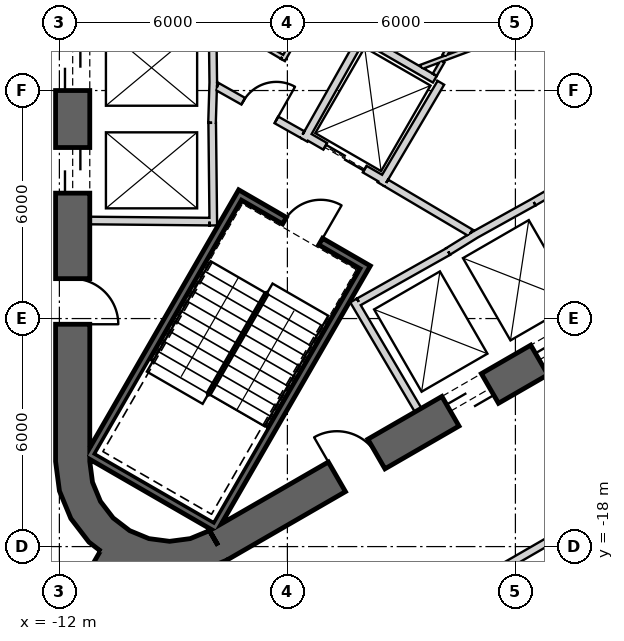
"""IFC4 building model, lengths in metres.
Left out: names, types, materials, properties, quantities, classifications, styles, units other than length and angle.
Written with IfcOpenShell. Run it as: python <this file> out.ifc"""

import sys

from ifc_helpers import new_model, si_unit, direction, frame, frame_2d, origin, place, context, subcontext, project, spatial, polyline, rectangle, outline, extrude, element, fill, save


model = new_model("IFC4")
c1 = context("Model", 3, precision=1e-05, world=origin(), true_north=direction((0.0, 1.0)))
c2 = subcontext(c1, "Body", "Model", "MODEL_VIEW")
j1 = project(units=[si_unit("LENGTHUNIT", "METRE"), si_unit("PLANEANGLEUNIT", "RADIAN")], contexts=[c1])
p1 = place(None, origin())
s1 = spatial("IfcSite", under=j1, at=p1, CompositionType="ELEMENT")
p2 = place(p1, origin())
s2 = spatial("IfcBuilding", under=s1, at=p2, CompositionType="ELEMENT")
p3 = place(p2, frame((0.0, 0.0, 45.5)))
s3 = spatial("IfcBuildingStorey", under=s2, at=p3, CompositionType="ELEMENT", Elevation=45.5)
p4 = place(p3, frame((-11.65, 15.762, 0.0), z_axis=(0.0, 0.0, 1.0), x_axis=(0.0, -1.0, 0.0)))
e1 = element("IfcWall", 1, at=p4, inside=s3, PredefinedType="SHEAR", context=c2, shape_type="SweptSolid", body=[
    extrude(rectangle(XDim=31.523, YDim=0.9, at=frame_2d((15.762, 0.0))), origin(), (0.0, 0.0, 1.0), 4.1),
])
p5 = place(p4, frame((7.062, 0.0, 0.0)))
e2 = element("IfcOpeningElement", 2, at=p5, cuts=e1, PredefinedType="OPENING", context=c2, shape_type="SweptSolid", body=[
    extrude(rectangle(XDim=1.2, YDim=2.4, at=frame_2d((0.6, 1.2))), frame((0.0, 0.46, 0.0), z_axis=(0.0, -1.0, 0.0), x_axis=(1.0, 0.0, 0.0)), (0.0, 0.0, 1.0), 0.92),
])
p6 = place(p4, frame((9.762, 0.0, 0.0)))
e3 = element("IfcOpeningElement", 3, at=p6, cuts=e1, PredefinedType="OPENING", context=c2, shape_type="SweptSolid", body=[
    extrude(rectangle(XDim=1.2, YDim=2.4, at=frame_2d((0.6, 1.2))), frame((0.0, 0.46, 0.0), z_axis=(0.0, -1.0, 0.0), x_axis=(1.0, 0.0, 0.0)), (0.0, 0.0, 1.0), 0.92),
])
p7 = place(p4, frame((12.462, 0.0, 0.0)))
e4 = element("IfcOpeningElement", 4, at=p7, cuts=e1, PredefinedType="OPENING", context=c2, shape_type="SweptSolid", body=[
    extrude(rectangle(XDim=1.2, YDim=2.4, at=frame_2d((0.6, 1.2))), frame((0.0, 0.46, 0.0), z_axis=(0.0, -1.0, 0.0), x_axis=(1.0, 0.0, 0.0)), (0.0, 0.0, 1.0), 0.92),
])
p8 = place(p4, frame((15.162, 0.0, 0.0)))
e5 = element("IfcOpeningElement", 5, at=p8, cuts=e1, PredefinedType="OPENING", context=c2, shape_type="SweptSolid", body=[
    extrude(rectangle(XDim=1.2, YDim=2.4, at=frame_2d((0.6, 1.2))), frame((0.0, 0.46, 0.0), z_axis=(0.0, -1.0, 0.0), x_axis=(1.0, 0.0, 0.0)), (0.0, 0.0, 1.0), 0.92),
])
p9 = place(p4, frame((17.862, 0.0, 0.0)))
e6 = element("IfcOpeningElement", 6, at=p9, cuts=e1, PredefinedType="OPENING", context=c2, shape_type="SweptSolid", body=[
    extrude(rectangle(XDim=1.2, YDim=2.4, at=frame_2d((0.6, 1.2))), frame((0.0, 0.46, 0.0), z_axis=(0.0, -1.0, 0.0), x_axis=(1.0, 0.0, 0.0)), (0.0, 0.0, 1.0), 0.92),
])
p10 = place(p4, frame((20.562, 0.0, 0.0)))
e7 = element("IfcOpeningElement", 7, at=p10, cuts=e1, PredefinedType="OPENING", context=c2, shape_type="SweptSolid", body=[
    extrude(rectangle(XDim=1.2, YDim=2.4, at=frame_2d((0.6, 1.2))), frame((0.0, 0.46, 0.0), z_axis=(0.0, -1.0, 0.0), x_axis=(1.0, 0.0, 0.0)), (0.0, 0.0, 1.0), 0.92),
])
p11 = place(p4, frame((23.262, 0.0, 0.0)))
e8 = element("IfcOpeningElement", 8, at=p11, cuts=e1, PredefinedType="OPENING", context=c2, shape_type="SweptSolid", body=[
    extrude(rectangle(XDim=1.2, YDim=2.4, at=frame_2d((0.6, 1.2))), frame((0.0, 0.46, 0.0), z_axis=(0.0, -1.0, 0.0), x_axis=(1.0, 0.0, 0.0)), (0.0, 0.0, 1.0), 0.92),
])
p12 = place(p4, frame((3.612, 0.0, 0.0)))
e9 = element("IfcOpeningElement", 9, at=p12, cuts=e1, PredefinedType="OPENING", context=c2, shape_type="SweptSolid", body=[
    extrude(rectangle(XDim=1.2, YDim=2.4, at=frame_2d((0.6, 1.2))), frame((0.0, 0.46, 0.0), z_axis=(0.0, -1.0, 0.0), x_axis=(1.0, 0.0, 0.0)), (0.0, 0.0, 1.0), 0.92),
])
p13 = place(p4, frame((26.712, 0.0, 0.0)))
e10 = element("IfcOpeningElement", 10, at=p13, cuts=e1, PredefinedType="OPENING", context=c2, shape_type="SweptSolid", body=[
    extrude(rectangle(XDim=1.2, YDim=2.4, at=frame_2d((0.6, 1.2))), frame((0.0, 0.46, 0.0), z_axis=(0.0, -1.0, 0.0), x_axis=(1.0, 0.0, 0.0)), (0.0, 0.0, 1.0), 0.92),
])
p14 = place(p3, frame((-7.825, -17.97, 0.0), z_axis=(0.0, 0.0, 1.0), x_axis=(0.866028369851, 0.499994862586, 0.0)))
e11 = element("IfcWall", 11, at=p14, inside=s3, PredefinedType="SHEAR", context=c2, shape_type="SweptSolid", body=[
    extrude(rectangle(XDim=31.523, YDim=0.9, at=frame_2d((15.762, 0.0))), origin(), (0.0, 0.0, 1.0), 4.1),
])
p15 = place(p14, frame((7.062, 0.0, 0.0)))
e12 = element("IfcOpeningElement", 12, at=p15, cuts=e11, PredefinedType="OPENING", context=c2, shape_type="SweptSolid", body=[
    extrude(rectangle(XDim=1.2, YDim=2.4, at=frame_2d((0.6, 1.2))), frame((0.0, 0.46, 0.0), z_axis=(0.0, -1.0, 0.0), x_axis=(1.0, 0.0, 0.0)), (0.0, 0.0, 1.0), 0.92),
])
p16 = place(p14, frame((9.762, 0.0, 0.0)))
e13 = element("IfcOpeningElement", 13, at=p16, cuts=e11, PredefinedType="OPENING", context=c2, shape_type="SweptSolid", body=[
    extrude(rectangle(XDim=1.2, YDim=2.4, at=frame_2d((0.6, 1.2))), frame((0.0, 0.46, 0.0), z_axis=(0.0, -1.0, 0.0), x_axis=(1.0, 0.0, 0.0)), (0.0, 0.0, 1.0), 0.92),
])
p17 = place(p14, frame((12.462, 0.0, 0.0)))
e14 = element("IfcOpeningElement", 14, at=p17, cuts=e11, PredefinedType="OPENING", context=c2, shape_type="SweptSolid", body=[
    extrude(rectangle(XDim=1.2, YDim=2.4, at=frame_2d((0.6, 1.2))), frame((0.0, 0.46, 0.0), z_axis=(0.0, -1.0, 0.0), x_axis=(1.0, 0.0, 0.0)), (0.0, 0.0, 1.0), 0.92),
])
p18 = place(p14, frame((15.162, 0.0, 0.0)))
e15 = element("IfcOpeningElement", 15, at=p18, cuts=e11, PredefinedType="OPENING", context=c2, shape_type="SweptSolid", body=[
    extrude(rectangle(XDim=1.2, YDim=2.4, at=frame_2d((0.6, 1.2))), frame((0.0, 0.46, 0.0), z_axis=(0.0, -1.0, 0.0), x_axis=(1.0, 0.0, 0.0)), (0.0, 0.0, 1.0), 0.92),
])
p19 = place(p14, frame((17.862, 0.0, 0.0)))
e16 = element("IfcOpeningElement", 16, at=p19, cuts=e11, PredefinedType="OPENING", context=c2, shape_type="SweptSolid", body=[
    extrude(rectangle(XDim=1.2, YDim=2.4, at=frame_2d((0.6, 1.2))), frame((0.0, 0.46, 0.0), z_axis=(0.0, -1.0, 0.0), x_axis=(1.0, 0.0, 0.0)), (0.0, 0.0, 1.0), 0.92),
])
p20 = place(p14, frame((20.562, 0.0, 0.0)))
e17 = element("IfcOpeningElement", 17, at=p20, cuts=e11, PredefinedType="OPENING", context=c2, shape_type="SweptSolid", body=[
    extrude(rectangle(XDim=1.2, YDim=2.4, at=frame_2d((0.6, 1.2))), frame((0.0, 0.46, 0.0), z_axis=(0.0, -1.0, 0.0), x_axis=(1.0, 0.0, 0.0)), (0.0, 0.0, 1.0), 0.92),
])
p21 = place(p14, frame((26.712, 0.0, 0.0)))
e18 = element("IfcOpeningElement", 18, at=p21, cuts=e11, PredefinedType="OPENING", context=c2, shape_type="SweptSolid", body=[
    extrude(rectangle(XDim=1.2, YDim=2.4, at=frame_2d((0.6, 1.2))), frame((0.0, 0.46, 0.0), z_axis=(0.0, -1.0, 0.0), x_axis=(1.0, 0.0, 0.0)), (0.0, 0.0, 1.0), 0.92),
])
p22 = place(p14, frame((3.612, 0.0, 0.0)))
e19 = element("IfcOpeningElement", 19, at=p22, cuts=e11, PredefinedType="OPENING", context=c2, shape_type="SweptSolid", body=[
    extrude(rectangle(XDim=1.2, YDim=2.4, at=frame_2d((0.6, 1.2))), frame((0.0, 0.46, 0.0), z_axis=(0.0, -1.0, 0.0), x_axis=(1.0, 0.0, 0.0)), (0.0, 0.0, 1.0), 0.92),
])
p23 = place(p3, origin())
e20 = element("IfcWall", 20, at=p23, inside=s3, PredefinedType="SHEAR", context=c2, shape_type="SweptSolid", body=[
    extrude(outline(polyline([(-12.1, -15.762), (-11.998, -16.538), (-11.698, -17.262), (-11.221, -17.883), (-10.6, -18.36), (-9.876, -18.659), (-9.1, -18.762), (-8.323, -18.659), (-7.6, -18.36), (-8.05, -17.58), (-8.556, -17.79), (-9.1, -17.862), (-9.644, -17.79), (-10.15, -17.58), (-10.585, -17.247), (-10.919, -16.812), (-11.128, -16.305), (-11.2, -15.762), (-12.1, -15.762)])), origin(), (0.0, 0.0, 1.0), 4.1),
])
p24 = place(p3, frame((-10.575, -18.316, 0.0), z_axis=(0.0, 0.0, 1.0), x_axis=(-0.499996272984, -0.866027555568, 0.0)))
e21 = element("IfcWall", 21, at=p24, inside=s3, PredefinedType="SHEAR", context=c2, shape_type="SweptSolid", body=[
    extrude(rectangle(XDim=14.098, YDim=0.8, at=frame_2d((7.049, 0.0))), origin(), (0.0, 0.0, 1.0), 4.1),
])
p25 = place(p24, frame((0.7, 0.0, 0.0)))
e22 = element("IfcOpeningElement", 22, at=p25, cuts=e21, PredefinedType="OPENING", context=c2, shape_type="SweptSolid", body=[
    extrude(rectangle(XDim=1.4, YDim=2.4, at=frame_2d((0.7, 1.2))), frame((0.0, 0.41, 0.0), z_axis=(0.0, -1.0, 0.0), x_axis=(1.0, 0.0, 0.0)), (0.0, 0.0, 1.0), 0.82),
])
p26 = place(p3, frame((-7.95, -5.772, 0.0), z_axis=(0.0, 0.0, 1.0), x_axis=(-0.030803413295, -0.999525462272, 0.0)))
e23 = element("IfcWall", 23, at=p26, inside=s3, PredefinedType="PLUMBINGWALL", context=c2, shape_type="SweptSolid", body=[
    extrude(rectangle(XDim=1.078, YDim=0.2, at=frame_2d((0.539, 0.0))), origin(), (0.0, 0.0, 1.0), 3.8),
])
p27 = place(p3, frame((-7.971, -4.05, 0.0), z_axis=(0.0, 0.0, 1.0), x_axis=(0.012042535896, -0.999927486035, 0.0)))
e24 = element("IfcWall", 24, at=p27, inside=s3, PredefinedType="PLUMBINGWALL", context=c2, shape_type="SweptSolid", body=[
    extrude(rectangle(XDim=1.845, YDim=0.2, at=frame_2d((0.922, 0.0))), origin(), (0.0, 0.0, 1.0), 3.8),
])
p28 = place(p3, frame((-7.979, -6.85, 0.0), z_axis=(0.0, 0.0, 1.0), x_axis=(0.011121475088, -0.999938154483, 0.0)))
e25 = element("IfcWall", 25, at=p28, inside=s3, PredefinedType="PLUMBINGWALL", context=c2, shape_type="SweptSolid", body=[
    extrude(rectangle(XDim=2.7, YDim=0.2, at=frame_2d((1.35, 0.0))), origin(), (0.0, 0.0, 1.0), 3.8),
])
p29 = place(p3, frame((-8.05, -9.449, 0.0), z_axis=(0.0, 0.0, 1.0), x_axis=(-0.999957467379, 0.009222983926, 0.0)))
e26 = element("IfcWall", 26, at=p29, inside=s3, PredefinedType="PLUMBINGWALL", context=c2, shape_type="SweptSolid", body=[
    extrude(rectangle(XDim=3.15, YDim=0.2, at=frame_2d((1.575, 0.0))), origin(), (0.0, 0.0, 1.0), 3.8),
])
p30 = place(p3, frame((0.483, -8.936, 0.0), z_axis=(0.0, 0.0, 1.0), x_axis=(0.866030989016, 0.499990325971, 0.0)))
e27 = element("IfcWall", 27, at=p30, inside=s3, PredefinedType="PLUMBINGWALL", context=c2, shape_type="SweptSolid", body=[
    extrude(rectangle(XDim=8.1, YDim=0.2, at=frame_2d((4.05, 0.0))), origin(), (0.0, 0.0, 1.0), 3.8),
])
p31 = place(p3, frame((-2.558, -14.409, 0.0), z_axis=(0.0, 0.0, 1.0), x_axis=(-0.507997497166, 0.861358544901, 0.0)))
e28 = element("IfcWall", 28, at=p31, inside=s3, PredefinedType="PLUMBINGWALL", context=c2, shape_type="SweptSolid", body=[
    extrude(rectangle(XDim=3.35, YDim=0.2, at=frame_2d((1.675, 0.0))), origin(), (0.0, 0.0, 1.0), 3.8),
])
p32 = place(p3, frame((-1.769, -10.237, 0.0), z_axis=(0.0, 0.0, 1.0), x_axis=(-0.871534483978, -0.490334215854, 0.0)))
e29 = element("IfcWall", 29, at=p32, inside=s3, PredefinedType="PLUMBINGWALL", context=c2, shape_type="SweptSolid", body=[
    extrude(rectangle(XDim=2.7, YDim=0.2, at=frame_2d((1.35, 0.0))), origin(), (0.0, 0.0, 1.0), 3.8),
])
p33 = place(p3, frame((-1.024, -9.771, 0.0), z_axis=(0.0, 0.0, 1.0), x_axis=(-0.850348075135, -0.526220629693, 0.0)))
e30 = element("IfcWall", 30, at=p33, inside=s3, PredefinedType="PLUMBINGWALL", context=c2, shape_type="SweptSolid", body=[
    extrude(rectangle(XDim=0.878, YDim=0.2, at=frame_2d((0.439, 0.0))), origin(), (0.0, 0.0, 1.0), 3.8),
])
p34 = place(p3, frame((-1.13, -9.831, 0.0), z_axis=(0.0, 0.0, 1.0), x_axis=(0.874269620932, 0.485440655401, 0.0)))
e31 = element("IfcWall", 31, at=p34, inside=s3, PredefinedType="PLUMBINGWALL", context=c2, shape_type="SweptSolid", body=[
    extrude(rectangle(XDim=1.845, YDim=0.2, at=frame_2d((0.922, 0.0))), origin(), (0.0, 0.0, 1.0), 3.8),
])
p35 = place(p3, frame((-3.905, -10.563, -0.3), z_axis=(0.0, 0.0, 1.0), x_axis=(-0.500012932018, -0.866017937352, 0.0)))
e32 = element("IfcWall", 32, at=p35, inside=s3, PredefinedType="SHEAR", context=c2, shape_type="SweptSolid", body=[
    extrude(rectangle(XDim=8.1, YDim=0.2, at=frame_2d((4.05, 0.0))), origin(), (0.0, 0.0, 1.0), 4.1),
])
p36 = place(p3, frame((-11.282, -15.541, -0.3), z_axis=(0.0, 0.0, 1.0), x_axis=(0.866000483506, -0.500043160704, 0.0)))
e33 = element("IfcWall", 33, at=p36, inside=s3, PredefinedType="SHEAR", context=c2, shape_type="SweptSolid", body=[
    extrude(rectangle(XDim=3.8, YDim=0.2, at=frame_2d((1.9, 0.0))), origin(), (0.0, 0.0, 1.0), 4.1),
])
p37 = place(p3, frame((-7.196, -8.663, -0.3), z_axis=(0.0, 0.0, 1.0), x_axis=(-0.499997992926, -0.866026562566, 0.0)))
e34 = element("IfcWall", 34, at=p37, inside=s3, PredefinedType="SHEAR", context=c2, shape_type="SweptSolid", body=[
    extrude(rectangle(XDim=7.9, YDim=0.2, at=frame_2d((3.95, 0.0))), origin(), (0.0, 0.0, 1.0), 4.1),
])
p38 = place(p3, frame((-4.041, -10.599, -0.3), z_axis=(0.0, 0.0, 1.0), x_axis=(-0.866047807691, 0.499961193289, 0.0)))
e35 = element("IfcWall", 35, at=p38, inside=s3, PredefinedType="SHEAR", context=c2, shape_type="SweptSolid", body=[
    extrude(rectangle(XDim=3.6, YDim=0.2, at=frame_2d((1.8, 0.0))), origin(), (0.0, 0.0, 1.0), 4.1),
])
p39 = place(p38, frame((1.25, 0.0, 0.3)))
e36 = element("IfcOpeningElement", 36, at=p39, cuts=e35, PredefinedType="OPENING", context=c2, shape_type="SweptSolid", body=[
    extrude(rectangle(XDim=1.1, YDim=2.1, at=frame_2d((0.55, 1.05))), frame((0.0, 0.11, 0.0), z_axis=(0.0, -1.0, 0.0), x_axis=(1.0, 0.0, 0.0)), (0.0, 0.0, 1.0), 0.22),
])
p40 = place(p3, frame((-3.446, -8.368, 0.0), z_axis=(0.0, 0.0, 1.0), x_axis=(-0.866024647952, 0.500001309137, 0.0)))
e37 = element("IfcWall", 37, at=p40, inside=s3, PredefinedType="PLUMBINGWALL", context=c2, shape_type="SweptSolid", body=[
    extrude(rectangle(XDim=2.4, YDim=0.2, at=frame_2d((1.2, 0.0))), origin(), (0.0, 0.0, 1.0), 3.8),
])
p41 = place(p40, frame((0.6, 0.0, 0.0)))
e38 = element("IfcOpeningElement", 38, at=p41, cuts=e37, PredefinedType="OPENING", context=c2, shape_type="SweptSolid", body=[
    extrude(rectangle(XDim=1.2, YDim=2.4, at=frame_2d((0.6, 1.2))), frame((0.0, 0.11, 0.0), z_axis=(0.0, -1.0, 0.0), x_axis=(1.0, 0.0, 0.0)), (0.0, 0.0, 1.0), 0.22),
])
p42 = place(p3, frame((-1.961, -5.796, 0.0), z_axis=(0.0, 0.0, 1.0), x_axis=(-0.508647062354, -0.860975125052, 0.0)))
e39 = element("IfcWall", 39, at=p42, inside=s3, PredefinedType="PLUMBINGWALL", context=c2, shape_type="SweptSolid", body=[
    extrude(rectangle(XDim=3.1, YDim=0.2, at=frame_2d((1.55, 0.0))), origin(), (0.0, 0.0, 1.0), 3.8),
])
p43 = place(p3, frame((-3.99, -4.509, 0.0), z_axis=(0.0, 0.0, 1.0), x_axis=(-0.491358283181, -0.870957540612, 0.0)))
e40 = element("IfcWall", 40, at=p43, inside=s3, PredefinedType="PLUMBINGWALL", context=c2, shape_type="SweptSolid", body=[
    extrude(rectangle(XDim=3.2, YDim=0.2, at=frame_2d((1.6, 0.0))), origin(), (0.0, 0.0, 1.0), 3.8),
])
p44 = place(p3, frame((-3.953, -4.646, 0.0), z_axis=(0.0, 0.0, 1.0), x_axis=(0.866060616833, -0.499939004251, 0.0)))
e41 = element("IfcWall", 41, at=p44, inside=s3, PredefinedType="PLUMBINGWALL", context=c2, shape_type="SweptSolid", body=[
    extrude(rectangle(XDim=2.115, YDim=0.2, at=frame_2d((1.057, 0.0))), origin(), (0.0, 0.0, 1.0), 3.8),
])
p45 = place(p3, frame((-3.401, -8.43, 0.0), z_axis=(0.0, 0.0, 1.0), x_axis=(0.860615607571, -0.509255118781, 0.0)))
e42 = element("IfcWall", 42, at=p45, inside=s3, PredefinedType="PARTITIONING", context=c2, shape_type="SweptSolid", body=[
    extrude(rectangle(XDim=2.581, YDim=0.2, at=frame_2d((1.29, 0.0))), origin(), (0.0, 0.0, 1.0), 3.8),
])
p46 = place(p3, frame((-7.849, -5.894, 0.0), z_axis=(0.0, 0.0, 1.0), x_axis=(0.871363259478, -0.490638431059, 0.0)))
e43 = element("IfcWall", 43, at=p46, inside=s3, PredefinedType="PARTITIONING", context=c2, shape_type="SweptSolid", body=[
    extrude(rectangle(XDim=2.581, YDim=0.2, at=frame_2d((1.291, 0.0))), origin(), (0.0, 0.0, 1.0), 3.8),
])
p47 = place(p46, frame((0.791, 0.0, 0.0)))
e44 = element("IfcOpeningElement", 44, at=p47, cuts=e43, PredefinedType="OPENING", context=c2, shape_type="SweptSolid", body=[
    extrude(rectangle(XDim=1.0, YDim=2.1, at=frame_2d((0.5, 1.05))), frame((0.0, 0.11, 0.0), z_axis=(0.0, -1.0, 0.0), x_axis=(1.0, 0.0, 0.0)), (0.0, 0.0, 1.0), 0.22),
])
p48 = place(p3, frame((4.769, -2.673, 0.0), z_axis=(0.0, 0.0, 1.0), x_axis=(-0.936819599564, -0.349812861217, 0.0)))
e45 = element("IfcWall", 45, at=p48, inside=s3, PredefinedType="PARTITIONING", context=c2, shape_type="SweptSolid", body=[
    extrude(rectangle(XDim=7.739, YDim=0.12, at=frame_2d((3.87, 0.0))), origin(), (0.0, 0.0, 1.0), 3.8),
])
p49 = place(p3, frame((0.182, -1.535, 0.0), z_axis=(0.0, 0.0, 1.0), x_axis=(-0.499966268063, -0.866044878051, 0.0)))
e46 = element("IfcWall", 46, at=p49, inside=s3, PredefinedType="PARTITIONING", context=c2, shape_type="SweptSolid", body=[
    extrude(rectangle(XDim=4.103, YDim=0.12, at=frame_2d((2.051, 0.0))), origin(), (0.0, 0.0, 1.0), 3.8),
])
p50 = place(p49, frame((1.703, 0.0, 0.0)))
e47 = element("IfcOpeningElement", 47, at=p50, cuts=e46, PredefinedType="OPENING", context=c2, shape_type="SweptSolid", body=[
    extrude(rectangle(XDim=0.8, YDim=2.1, at=frame_2d((0.4, 1.05))), frame((0.0, 0.07, 0.0), z_axis=(0.0, -1.0, 0.0), x_axis=(1.0, 0.0, 0.0)), (0.0, 0.0, 1.0), 0.14),
])
p51 = place(p3, frame((-1.92, -5.235, 0.0), z_axis=(0.0, 0.0, 1.0), x_axis=(-0.499566316511, -0.86627564632, 0.0)))
e48 = element("IfcWall", 48, at=p51, inside=s3, PredefinedType="PARTITIONING", context=c2, shape_type="SweptSolid", body=[
    extrude(rectangle(XDim=0.406, YDim=0.12, at=frame_2d((0.203, 0.0))), origin(), (0.0, 0.0, 1.0), 3.8),
])
p52 = place(p3, frame((-6.118, -5.198, 0.0), z_axis=(0.0, 0.0, 1.0), x_axis=(0.488782681023, 0.872405576972, 0.0)))
e49 = element("IfcWall", 49, at=p52, inside=s3, PredefinedType="PARTITIONING", context=c2, shape_type="SweptSolid", body=[
    extrude(rectangle(XDim=2.322, YDim=0.12, at=frame_2d((1.161, 0.0))), origin(), (0.0, 0.0, 1.0), 3.8),
])
p53 = place(p52, frame((0.791, 0.0, 0.0)))
e50 = element("IfcOpeningElement", 50, at=p53, cuts=e49, PredefinedType="OPENING", context=c2, shape_type="SweptSolid", body=[
    extrude(rectangle(XDim=0.8, YDim=2.1, at=frame_2d((0.4, 1.05))), frame((0.0, 0.07, 0.0), z_axis=(0.0, -1.0, 0.0), x_axis=(1.0, 0.0, 0.0)), (0.0, 0.0, 1.0), 0.14),
])
p54 = place(p3, frame((-7.95, -4.041, 0.0), z_axis=(0.0, 0.0, 1.0), x_axis=(0.860112457103, -0.510104461004, 0.0)))
e51 = element("IfcWall", 51, at=p54, inside=s3, PredefinedType="PARTITIONING", context=c2, shape_type="SweptSolid", body=[
    extrude(rectangle(XDim=2.104, YDim=0.12, at=frame_2d((1.052, 0.0))), origin(), (0.0, 0.0, 1.0), 3.8),
])
p55 = place(p3, frame((-6.436, -22.075, 0.0), z_axis=(0.0, 0.0, 1.0), x_axis=(0.866022453651, 0.500005109747, 0.0)))
e52 = element("IfcWall", 52, at=p55, inside=s3, PredefinedType="PARTITIONING", context=c2, shape_type="SweptSolid", body=[
    extrude(rectangle(XDim=33.022, YDim=0.2, at=frame_2d((16.511, 0.0))), origin(), (0.0, 0.0, 1.0), 2.98),
])
p56 = place(p55, frame((20.89, 0.0, 0.0)))
e53 = element("IfcOpeningElement", 53, at=p56, cuts=e52, PredefinedType="OPENING", context=c2, shape_type="SweptSolid", body=[
    extrude(rectangle(XDim=1.0, YDim=2.1, at=frame_2d((0.5, 1.05))), frame((0.0, 0.11, 0.0), z_axis=(0.0, -1.0, 0.0), x_axis=(1.0, 0.0, 0.0)), (0.0, 0.0, 1.0), 0.22),
])
p57 = place(p55, frame((4.429, 0.0, 0.0)))
e54 = element("IfcOpeningElement", 54, at=p57, cuts=e52, PredefinedType="OPENING", context=c2, shape_type="SweptSolid", body=[
    extrude(rectangle(XDim=1.0, YDim=2.1, at=frame_2d((0.5, 1.05))), frame((0.0, 0.11, 0.0), z_axis=(0.0, -1.0, 0.0), x_axis=(1.0, 0.0, 0.0)), (0.0, 0.0, 1.0), 0.22),
])
p58 = place(p39, origin())
e55 = element("IfcDoor", 55, at=p58, inside=s3, OperationType="SINGLE_SWING_LEFT", PredefinedType="USERDEFINED", context=c2, shape_type="SweptSolid", body=[
    extrude(rectangle(XDim=1.1, YDim=2.1, at=frame_2d((0.55, 1.05))), frame((0.0, 0.025, 0.0), z_axis=(0.0, -1.0, 0.0), x_axis=(1.0, 0.0, 0.0)), (0.0, 0.0, 1.0), 0.05),
])
fill(e36, e55)
p59 = place(p47, origin())
e56 = element("IfcDoor", 56, at=p59, inside=s3, OperationType="SINGLE_SWING_LEFT", PredefinedType="USERDEFINED", context=c2, shape_type="SweptSolid", body=[
    extrude(rectangle(XDim=1.0, YDim=2.1, at=frame_2d((0.5, 1.05))), frame((0.0, 0.025, 0.0), z_axis=(0.0, -1.0, 0.0), x_axis=(1.0, 0.0, 0.0)), (0.0, 0.0, 1.0), 0.05),
])
fill(e44, e56)
p60 = place(p41, origin())
e57 = element("IfcDoor", 57, at=p60, inside=s3, OperationType="SLIDING_TO_LEFT", PredefinedType="USERDEFINED", context=c2, shape_type="SweptSolid", body=[
    extrude(rectangle(XDim=1.2, YDim=2.4, at=frame_2d((0.6, 1.2))), frame((0.0, 0.025, 0.0), z_axis=(0.0, -1.0, 0.0), x_axis=(1.0, 0.0, 0.0)), (0.0, 0.0, 1.0), 0.05),
])
fill(e38, e57)
p61 = place(p10, origin())
e58 = element("IfcDoor", 58, at=p61, inside=s3, OperationType="SLIDING_TO_LEFT", PredefinedType="USERDEFINED", context=c2, shape_type="SweptSolid", body=[
    extrude(rectangle(XDim=1.2, YDim=2.4, at=frame_2d((0.6, 1.2))), frame((0.0, 0.025, 0.0), z_axis=(0.0, -1.0, 0.0), x_axis=(1.0, 0.0, 0.0)), (0.0, 0.0, 1.0), 0.05),
])
fill(e7, e58)
p62 = place(p11, origin())
e59 = element("IfcDoor", 59, at=p62, inside=s3, OperationType="SLIDING_TO_LEFT", PredefinedType="USERDEFINED", context=c2, shape_type="SweptSolid", body=[
    extrude(rectangle(XDim=1.2, YDim=2.4, at=frame_2d((0.6, 1.2))), frame((0.0, 0.025, 0.0), z_axis=(0.0, -1.0, 0.0), x_axis=(1.0, 0.0, 0.0)), (0.0, 0.0, 1.0), 0.05),
])
fill(e8, e59)
p63 = place(p15, origin())
e60 = element("IfcDoor", 60, at=p63, inside=s3, OperationType="SLIDING_TO_LEFT", PredefinedType="USERDEFINED", context=c2, shape_type="SweptSolid", body=[
    extrude(rectangle(XDim=1.2, YDim=2.4, at=frame_2d((0.6, 1.2))), frame((0.0, 0.025, 0.0), z_axis=(0.0, -1.0, 0.0), x_axis=(1.0, 0.0, 0.0)), (0.0, 0.0, 1.0), 0.05),
])
fill(e12, e60)
p64 = place(p16, origin())
e61 = element("IfcDoor", 61, at=p64, inside=s3, OperationType="SLIDING_TO_LEFT", PredefinedType="USERDEFINED", context=c2, shape_type="SweptSolid", body=[
    extrude(rectangle(XDim=1.2, YDim=2.4, at=frame_2d((0.6, 1.2))), frame((0.0, 0.025, 0.0), z_axis=(0.0, -1.0, 0.0), x_axis=(1.0, 0.0, 0.0)), (0.0, 0.0, 1.0), 0.05),
])
fill(e13, e61)
p65 = place(p13, origin())
e62 = element("IfcDoor", 62, at=p65, inside=s3, OperationType="SINGLE_SWING_LEFT", PredefinedType="USERDEFINED", context=c2, shape_type="SweptSolid", body=[
    extrude(rectangle(XDim=1.2, YDim=2.4, at=frame_2d((0.6, 1.2))), frame((0.0, 0.025, 0.0), z_axis=(0.0, -1.0, 0.0), x_axis=(1.0, 0.0, 0.0)), (0.0, 0.0, 1.0), 0.05),
])
fill(e10, e62)
p66 = place(p22, origin())
e63 = element("IfcDoor", 63, at=p66, inside=s3, OperationType="SINGLE_SWING_LEFT", PredefinedType="USERDEFINED", context=c2, shape_type="SweptSolid", body=[
    extrude(rectangle(XDim=1.2, YDim=2.4, at=frame_2d((0.6, 1.2))), frame((0.0, 0.025, 0.0), z_axis=(0.0, -1.0, 0.0), x_axis=(1.0, 0.0, 0.0)), (0.0, 0.0, 1.0), 0.05),
])
fill(e19, e63)
save(model, sys.argv[1])
